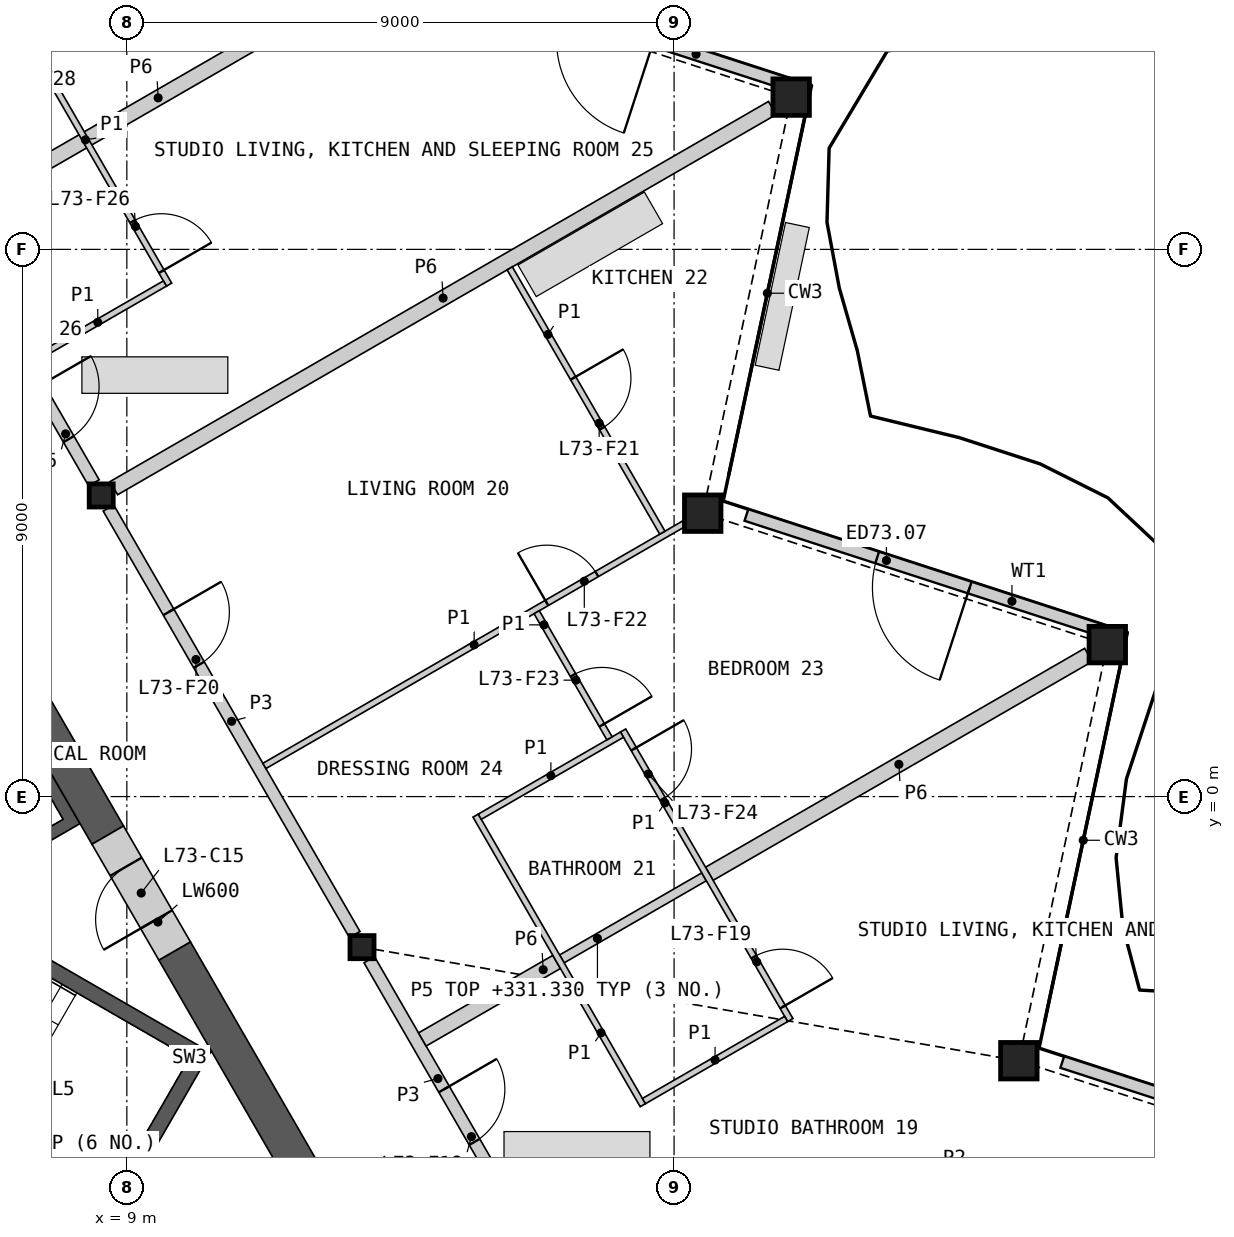
"""IFC4 building model, lengths in metres.
Left out: names, types, materials, properties, quantities, classifications, styles, units other than length and angle.
Written with IfcOpenShell. Run it as: python <this file> out.ifc"""

import sys

from ifc_helpers import new_model, si_unit, direction, frame, frame_2d, origin, origin_2d, place, context, subcontext, project, spatial, polyline, rectangle, hollow_rectangle, i_section, outline, extrude, element, fill, save


model = new_model("IFC4")
c1 = context("Model", 3, precision=1e-05, world=origin(), true_north=direction((0.0, 1.0)))
c2 = subcontext(c1, "Body", "Model", "MODEL_VIEW")
j1 = project(units=[si_unit("LENGTHUNIT", "METRE"), si_unit("PLANEANGLEUNIT", "RADIAN")], contexts=[c1])
p1 = place(None, origin())
s1 = spatial("IfcSite", under=j1, at=p1, CompositionType="ELEMENT")
p2 = place(p1, origin())
s2 = spatial("IfcBuilding", under=s1, at=p2, CompositionType="ELEMENT")
p3 = place(p2, frame((0.0, 0.0, 329.0)))
s3 = spatial("IfcBuildingStorey", under=s2, at=p3, CompositionType="ELEMENT", Elevation=329.0)
for number, where, z_axis, x_axis in (
    (1, (23.67, -4.344, 0.0), (0.0, 0.0, 1.0), (1.0, 0.0, 0.0)),
    (2, (25.125, 2.499, 0.0), (0.0, 0.0, 1.0), (1.0, 0.0, 0.0)),
    (3, (18.471, 4.661, 0.0), (0.0, 0.0, 1.0), (1.0, 0.0, 0.0)),
    (4, (19.926, 11.504, 0.0), (0.0, 0.0, 1.0), (1.0, 0.0, 0.0)),
):
    element("IfcColumn", number, at=place(p3, frame(where, z_axis=z_axis, x_axis=x_axis)), inside=s3, PredefinedType="COLUMN", context=c2, shape_type="SweptSolid", body=[
        extrude(hollow_rectangle(XDim=0.6, YDim=0.6, WallThickness=0.04, at=origin_2d()), origin(), (0.0, 0.0, 1.0), 3.4),
    ])
for number, where, z_axis, x_axis in (
    (5, (12.868, -2.476, 0.0), (0.0, 0.0, 1.0), (1.0, 0.0, 0.0)),
    (6, (8.578, 4.953, 0.0), (0.0, 0.0, 1.0), (1.0, 0.0, 0.0)),
):
    element("IfcColumn", number, at=place(p3, frame(where, z_axis=z_axis, x_axis=x_axis)), inside=s3, PredefinedType="COLUMN", context=c2, shape_type="SweptSolid", body=[
        extrude(i_section(OverallWidth=0.396, OverallDepth=0.381, WebThickness=0.019, FlangeThickness=0.03, at=origin_2d()), origin(), (0.0, 0.0, 1.0), 3.4),
    ])
p4 = place(p3, frame((30.207, -6.258, 0.0), z_axis=(0.0, 0.0, 1.0), x_axis=(-0.951056631566, 0.309016639608, 0.0)))
e7 = element("IfcWall", 7, at=p4, inside=s3, PredefinedType="SOLIDWALL", context=c2, shape_type="SweptSolid", body=[
    extrude(rectangle(XDim=6.122, YDim=0.2, at=frame_2d((3.061, 0.0))), origin(), (0.0, 0.0, 1.0), 2.488),
])
p5 = place(p4, frame((2.261, 0.0, 0.0)))
e8 = element("IfcOpeningElement", 8, at=p5, cuts=e7, PredefinedType="OPENING", context=c2, shape_type="SweptSolid", body=[
    extrude(rectangle(XDim=1.6, YDim=2.25, at=frame_2d((0.8, 1.125))), frame((0.0, 0.11, 0.0), z_axis=(0.0, -1.0, 0.0), x_axis=(1.0, 0.0, 0.0)), (0.0, 0.0, 1.0), 0.22),
])
p6 = place(p3, frame((25.012, 2.739, 0.0), z_axis=(0.0, 0.0, 1.0), x_axis=(-0.951056631566, 0.309016639608, 0.0)))
e9 = element("IfcWall", 9, at=p6, inside=s3, PredefinedType="SOLIDWALL", context=c2, shape_type="SweptSolid", body=[
    extrude(rectangle(XDim=6.122, YDim=0.2, at=frame_2d((3.061, 0.0))), origin(), (0.0, 0.0, 1.0), 2.488),
])
p7 = place(p6, frame((2.261, 0.0, 0.0)))
e10 = element("IfcOpeningElement", 10, at=p7, cuts=e9, PredefinedType="OPENING", context=c2, shape_type="SweptSolid", body=[
    extrude(rectangle(XDim=1.6, YDim=2.25, at=frame_2d((0.8, 1.125))), frame((0.0, 0.11, 0.0), z_axis=(0.0, -1.0, 0.0), x_axis=(1.0, 0.0, 0.0)), (0.0, 0.0, 1.0), 0.22),
])
p8 = place(p3, frame((19.817, 11.737, 0.0), z_axis=(0.0, 0.0, 1.0), x_axis=(-0.951056631566, 0.309016639608, 0.0)))
e11 = element("IfcWall", 11, at=p8, inside=s3, PredefinedType="SOLIDWALL", context=c2, shape_type="SweptSolid", body=[
    extrude(rectangle(XDim=6.122, YDim=0.2, at=frame_2d((3.061, 0.0))), origin(), (0.0, 0.0, 1.0), 2.488),
])
p9 = place(p8, frame((2.261, 0.0, 0.0)))
e12 = element("IfcOpeningElement", 12, at=p9, cuts=e11, PredefinedType="OPENING", context=c2, shape_type="SweptSolid", body=[
    extrude(rectangle(XDim=1.6, YDim=2.25, at=frame_2d((0.8, 1.125))), frame((0.0, 0.11, 0.0), z_axis=(0.0, -1.0, 0.0), x_axis=(1.0, 0.0, 0.0)), (0.0, 0.0, 1.0), 0.22),
])
p10 = place(p3, origin())
e13 = element("IfcWall", 13, at=p10, inside=s3, PredefinedType="SHEAR", context=c2, shape_type="SweptSolid", body=[
    extrude(outline(polyline([(1.561, 6.097), (3.731, 7.35), (8.231, -0.444), (6.061, -1.697), (5.96, -1.524), (7.952, -0.374), (6.952, 1.358), (4.96, 0.208), (4.861, 0.381), (6.852, 1.531), (5.852, 3.263), (3.861, 2.113), (3.76, 2.287), (5.752, 3.437), (4.752, 5.169), (2.76, 4.019), (2.66, 4.192), (4.652, 5.342), (3.652, 7.074), (1.66, 5.924), (1.561, 6.097)])), origin(), (0.0, 0.0, 1.0), 3.1),
])
p11 = place(p3, origin())
e14 = element("IfcWall", 14, at=p11, inside=s3, PredefinedType="SHEAR", context=c2, shape_type="SweptSolid", body=[
    extrude(outline(polyline([(3.763, -3.956), (8.83, -6.881), (8.738, -6.539), (3.888, -3.739), (3.763, -3.956)])), origin(), (0.0, 0.0, 1.0), 3.1),
])
p12 = place(p3, origin())
e15 = element("IfcWall", 15, at=p12, inside=s3, PredefinedType="SHEAR", context=c2, shape_type="SweptSolid", body=[
    extrude(outline(polyline([(8.83, -6.881), (10.374, -4.206), (10.032, -4.298), (8.738, -6.539), (8.83, -6.881)])), origin(), (0.0, 0.0, 1.0), 3.1),
])
p13 = place(p3, origin())
e16 = element("IfcWall", 16, at=p13, inside=s3, PredefinedType="SHEAR", context=c2, shape_type="SweptSolid", body=[
    extrude(outline(polyline([(10.032, -4.298), (10.374, -4.206), (5.307, -1.281), (5.182, -1.498), (10.032, -4.298)])), origin(), (0.0, 0.0, 1.0), 3.1),
])
p14 = place(p3, frame((8.686, -0.634, 0.0), z_axis=(0.0, 0.0, 1.0), x_axis=(-0.500004601921, 0.866022746848, 0.0)))
e17 = element("IfcWall", 17, at=p14, inside=s3, PredefinedType="SHEAR", context=c2, shape_type="SweptSolid", body=[
    extrude(rectangle(XDim=16.853, YDim=0.6, at=frame_2d((8.426, 0.0))), origin(), (0.0, 0.0, 1.0), 3.1),
])
p15 = place(p3, frame((12.221, -6.756, 0.0), z_axis=(0.0, 0.0, 1.0), x_axis=(-0.50000604952, 0.866021911064, 0.0)))
e18 = element("IfcWall", 18, at=p15, inside=s3, PredefinedType="SHEAR", context=c2, shape_type="SweptSolid", body=[
    extrude(rectangle(XDim=4.869, YDim=0.6, at=frame_2d((2.434, 0.0))), origin(), (0.0, 0.0, 1.0), 3.1),
])
p16 = place(p3, frame((9.786, -2.539, 0.0), z_axis=(0.0, 0.0, 1.0), x_axis=(-0.499981787252, 0.866035918664, 0.0)))
e19 = element("IfcWall", 19, at=p16, inside=s3, PredefinedType="SHEAR", context=c2, shape_type="SweptSolid", body=[
    extrude(rectangle(XDim=2.2, YDim=0.6, at=frame_2d((1.1, 0.0))), origin(), (0.0, 0.0, 1.0), 3.1),
])
p17 = place(p16, frame((0.6, 0.0, 0.0)))
e20 = element("IfcOpeningElement", 20, at=p17, cuts=e19, PredefinedType="OPENING", context=c2, shape_type="SweptSolid", body=[
    extrude(rectangle(XDim=1.0, YDim=2.1, at=frame_2d((0.5, 1.05))), frame((0.0, 0.31, 0.0), z_axis=(0.0, -1.0, 0.0), x_axis=(1.0, 0.0, 0.0)), (0.0, 0.0, 1.0), 0.62),
])
p18 = place(p3, frame((8.786, 5.073, 0.0), z_axis=(0.0, 0.0, 1.0), x_axis=(0.86602139559, 0.500006942333, 0.0)))
e21 = element("IfcWall", 21, at=p18, inside=s3, PredefinedType="PARTITIONING", context=c2, shape_type="SweptSolid", body=[
    extrude(rectangle(XDim=12.505, YDim=0.25, at=frame_2d((6.252, 0.0))), origin(), (0.0, 0.0, 1.0), 2.33),
])
p19 = place(p3, frame((4.409, 12.174, 0.0), z_axis=(0.0, 0.0, 1.0), x_axis=(0.499984266882, -0.866034487114, 0.0)))
e22 = element("IfcWall", 22, at=p19, inside=s3, PredefinedType="PARTITIONING", context=c2, shape_type="SweptSolid", body=[
    extrude(rectangle(XDim=8.099, YDim=0.2, at=frame_2d((4.049, 0.0))), origin(), (0.0, 0.0, 1.0), 3.1),
])
p20 = place(p19, frame((6.269, 0.0, 0.0)))
e23 = element("IfcOpeningElement", 23, at=p20, cuts=e22, PredefinedType="OPENING", context=c2, shape_type="SweptSolid", body=[
    extrude(rectangle(XDim=1.0, YDim=2.1, at=frame_2d((0.5, 1.05))), frame((0.0, 0.11, 0.0), z_axis=(0.0, -1.0, 0.0), x_axis=(1.0, 0.0, 0.0)), (0.0, 0.0, 1.0), 0.22),
])
p21 = place(p19, frame((1.164, 0.0, 0.0)))
e24 = element("IfcOpeningElement", 24, at=p21, cuts=e22, PredefinedType="OPENING", context=c2, shape_type="SweptSolid", body=[
    extrude(rectangle(XDim=1.0, YDim=2.1, at=frame_2d((0.5, 1.05))), frame((0.0, 0.11, 0.0), z_axis=(0.0, -1.0, 0.0), x_axis=(1.0, 0.0, 0.0)), (0.0, 0.0, 1.0), 0.22),
])
p22 = place(p3, frame((8.698, 4.745, 0.0), z_axis=(0.0, 0.0, 1.0), x_axis=(0.499984266882, -0.866034487114, 0.0)))
e25 = element("IfcWall", 25, at=p22, inside=s3, PredefinedType="PARTITIONING", context=c2, shape_type="SweptSolid", body=[
    extrude(rectangle(XDim=8.099, YDim=0.2, at=frame_2d((4.049, 0.0))), origin(), (0.0, 0.0, 1.0), 3.1),
])
p23 = place(p22, frame((1.976, 0.0, 0.0)))
e26 = element("IfcOpeningElement", 26, at=p23, cuts=e25, PredefinedType="OPENING", context=c2, shape_type="SweptSolid", body=[
    extrude(rectangle(XDim=1.0, YDim=2.1, at=frame_2d((0.5, 1.05))), frame((0.0, 0.11, 0.0), z_axis=(0.0, -1.0, 0.0), x_axis=(1.0, 0.0, 0.0)), (0.0, 0.0, 1.0), 0.22),
])
p24 = place(p3, frame((6.068, 9.501, 0.0), z_axis=(0.0, 0.0, 1.0), x_axis=(0.866022671543, 0.50000473235, 0.0)))
e27 = element("IfcWall", 27, at=p24, inside=s3, PredefinedType="PARTITIONING", context=c2, shape_type="SweptSolid", body=[
    extrude(rectangle(XDim=7.961, YDim=0.25, at=frame_2d((3.98, 0.0))), origin(), (0.0, 0.0, 1.0), 2.33),
])
p25 = place(p3, frame((18.58, -1.27, 0.0), z_axis=(0.0, 0.0, 1.0), x_axis=(0.866024647952, 0.500001309137, 0.0)))
e28 = element("IfcWall", 28, at=p25, inside=s3, PredefinedType="PARTITIONING", context=c2, shape_type="SweptSolid", body=[
    extrude(rectangle(XDim=7.2, YDim=0.25, at=frame_2d((3.6, 0.0))), origin(), (0.0, 0.0, 1.0), 2.33),
])
p26 = place(p3, frame((12.988, -2.684, 0.0), z_axis=(0.0, 0.0, 1.0), x_axis=(0.49999094734, -0.866030630277, 0.0)))
e29 = element("IfcWall", 29, at=p26, inside=s3, PredefinedType="PARTITIONING", context=c2, shape_type="SweptSolid", body=[
    extrude(rectangle(XDim=4.513, YDim=0.2, at=frame_2d((2.256, 0.0))), origin(), (0.0, 0.0, 1.0), 3.1),
])
p27 = place(p26, frame((2.459, 0.0, 0.0)))
e30 = element("IfcOpeningElement", 30, at=p27, cuts=e29, PredefinedType="OPENING", context=c2, shape_type="SweptSolid", body=[
    extrude(rectangle(XDim=1.0, YDim=2.1, at=frame_2d((0.5, 1.05))), frame((0.0, 0.11, 0.0), z_axis=(0.0, -1.0, 0.0), x_axis=(1.0, 0.0, 0.0)), (0.0, 0.0, 1.0), 0.22),
])
p28 = place(p3, frame((13.86, -3.995, 0.0), z_axis=(0.0, 0.0, 1.0), x_axis=(0.866030925526, 0.499990435942, 0.0)))
e31 = element("IfcWall", 31, at=p28, inside=s3, PredefinedType="PARTITIONING", context=c2, shape_type="SweptSolid", body=[
    extrude(rectangle(XDim=2.55, YDim=0.25, at=frame_2d((1.275, 0.0))), origin(), (0.0, 0.0, 1.0), 2.33),
])
p29 = place(p3, frame((16.155, -2.67, 0.0), z_axis=(0.0, 0.0, 1.0), x_axis=(0.86599734893, 0.500048589285, 0.0)))
e32 = element("IfcWall", 32, at=p29, inside=s3, PredefinedType="PLUMBINGWALL", context=c2, shape_type="SweptSolid", body=[
    extrude(rectangle(XDim=2.7, YDim=0.15, at=frame_2d((1.35, 0.0))), origin(), (0.0, 0.0, 1.0), 2.33),
])
p30 = place(p3, frame((11.262, 0.504, 0.0), z_axis=(0.0, 0.0, 1.0), x_axis=(0.866020217342, 0.500008983073, 0.0)))
e33 = element("IfcWall", 33, at=p30, inside=s3, PredefinedType="PARTITIONING", context=c2, shape_type="SweptSolid", body=[
    extrude(rectangle(XDim=7.966, YDim=0.1, at=frame_2d((3.983, 0.0))), origin(), (0.0, 0.0, 1.0), 2.33),
])
p31 = place(p30, frame((5.362, 0.0, 0.0)))
e34 = element("IfcOpeningElement", 34, at=p31, cuts=e33, PredefinedType="OPENING", context=c2, shape_type="SweptSolid", body=[
    extrude(rectangle(XDim=0.95, YDim=2.1, at=frame_2d((0.475, 1.05))), frame((0.0, 0.06, 0.0), z_axis=(0.0, -1.0, 0.0), x_axis=(1.0, 0.0, 0.0)), (0.0, 0.0, 1.0), 0.12),
])
p32 = place(p3, frame((17.161, 1.087, 0.0), z_axis=(0.0, 0.0, 1.0), x_axis=(0.499996545922, -0.866027397988, 0.0)))
e35 = element("IfcWall", 35, at=p32, inside=s3, PredefinedType="PARTITIONING", context=c2, shape_type="SweptSolid", body=[
    extrude(rectangle(XDim=5.5, YDim=0.1, at=frame_2d((2.75, 0.0))), origin(), (0.0, 0.0, 1.0), 2.33),
])
p33 = place(p32, frame((4.3, 0.0, 0.0)))
e36 = element("IfcOpeningElement", 36, at=p33, cuts=e35, PredefinedType="OPENING", context=c2, shape_type="SweptSolid", body=[
    extrude(rectangle(XDim=0.95, YDim=2.1, at=frame_2d((0.475, 1.05))), frame((0.0, 0.06, 0.0), z_axis=(0.0, -1.0, 0.0), x_axis=(1.0, 0.0, 0.0)), (0.0, 0.0, 1.0), 0.12),
])
p34 = place(p32, frame((0.351, 0.0, 0.0)))
e37 = element("IfcOpeningElement", 37, at=p34, cuts=e35, PredefinedType="OPENING", context=c2, shape_type="SweptSolid", body=[
    extrude(rectangle(XDim=0.95, YDim=2.1, at=frame_2d((0.475, 1.05))), frame((0.0, 0.06, 0.0), z_axis=(0.0, -1.0, 0.0), x_axis=(1.0, 0.0, 0.0)), (0.0, 0.0, 1.0), 0.12),
])
p35 = place(p3, frame((14.736, -0.313, 0.0), z_axis=(0.0, 0.0, 1.0), x_axis=(0.49997732567, -0.866038494419, 0.0)))
e38 = element("IfcWall", 38, at=p35, inside=s3, PredefinedType="PARTITIONING", context=c2, shape_type="SweptSolid", body=[
    extrude(rectangle(XDim=5.5, YDim=0.1, at=frame_2d((2.75, 0.0))), origin(), (0.0, 0.0, 1.0), 2.33),
])
p36 = place(p3, frame((6.944, 13.183, 0.0), z_axis=(0.0, 0.0, 1.0), x_axis=(0.499996545922, -0.866027397988, 0.0)))
e39 = element("IfcWall", 39, at=p36, inside=s3, PredefinedType="PARTITIONING", context=c2, shape_type="SweptSolid", body=[
    extrude(rectangle(XDim=5.5, YDim=0.1, at=frame_2d((2.75, 0.0))), origin(), (0.0, 0.0, 1.0), 2.33),
])
p37 = place(p36, frame((4.3, 0.0, 0.0)))
e40 = element("IfcOpeningElement", 40, at=p37, cuts=e39, PredefinedType="OPENING", context=c2, shape_type="SweptSolid", body=[
    extrude(rectangle(XDim=0.95, YDim=2.1, at=frame_2d((0.475, 1.05))), frame((0.0, 0.06, 0.0), z_axis=(0.0, -1.0, 0.0), x_axis=(1.0, 0.0, 0.0)), (0.0, 0.0, 1.0), 0.12),
])
p38 = place(p36, frame((0.25, 0.0, 0.0)))
e41 = element("IfcOpeningElement", 41, at=p38, cuts=e39, PredefinedType="OPENING", context=c2, shape_type="SweptSolid", body=[
    extrude(rectangle(XDim=0.95, YDim=2.1, at=frame_2d((0.475, 1.05))), frame((0.0, 0.06, 0.0), z_axis=(0.0, -1.0, 0.0), x_axis=(1.0, 0.0, 0.0)), (0.0, 0.0, 1.0), 0.12),
])
p39 = place(p3, frame((15.297, 8.688, 0.0), z_axis=(0.0, 0.0, 1.0), x_axis=(0.499989096993, -0.866031698547, 0.0)))
e42 = element("IfcWall", 42, at=p39, inside=s3, PredefinedType="PARTITIONING", context=c2, shape_type="SweptSolid", body=[
    extrude(rectangle(XDim=5.02, YDim=0.1, at=frame_2d((2.51, 0.0))), origin(), (0.0, 0.0, 1.0), 2.33),
])
p40 = place(p39, frame((2.086, 0.0, 0.0)))
e43 = element("IfcOpeningElement", 43, at=p40, cuts=e42, PredefinedType="OPENING", context=c2, shape_type="SweptSolid", body=[
    extrude(rectangle(XDim=0.95, YDim=2.1, at=frame_2d((0.475, 1.05))), frame((0.0, 0.06, 0.0), z_axis=(0.0, -1.0, 0.0), x_axis=(1.0, 0.0, 0.0)), (0.0, 0.0, 1.0), 0.12),
])
p41 = place(p3, frame((17.505, -5.008, 0.0), z_axis=(0.0, 0.0, 1.0), x_axis=(0.866019956843, 0.50000943426, 0.0)))
e44 = element("IfcWall", 44, at=p41, inside=s3, PredefinedType="PARTITIONING", context=c2, shape_type="SweptSolid", body=[
    extrude(rectangle(XDim=2.7, YDim=0.1, at=frame_2d((1.35, 0.0))), origin(), (0.0, 0.0, 1.0), 2.33),
])
p42 = place(p3, frame((14.805, -0.331, 0.0), z_axis=(0.0, 0.0, 1.0), x_axis=(0.866059108428, 0.4999416173, 0.0)))
e45 = element("IfcWall", 45, at=p42, inside=s3, PredefinedType="PARTITIONING", context=c2, shape_type="SweptSolid", body=[
    extrude(rectangle(XDim=2.7, YDim=0.1, at=frame_2d((1.35, 0.0))), origin(), (0.0, 0.0, 1.0), 2.33),
])
p43 = place(p3, frame((7.418, 7.163, 0.0), z_axis=(0.0, 0.0, 1.0), x_axis=(0.866054858364, 0.499948979701, 0.0)))
e46 = element("IfcWall", 46, at=p43, inside=s3, PredefinedType="PARTITIONING", context=c2, shape_type="SweptSolid", body=[
    extrude(rectangle(XDim=2.55, YDim=0.1, at=frame_2d((1.275, 0.0))), origin(), (0.0, 0.0, 1.0), 2.33),
])
p44 = place(p3, frame((15.74, 3.032, 0.0), z_axis=(0.0, 0.0, 1.0), x_axis=(0.500075453945, -0.865981836046, 0.0)))
e47 = element("IfcWall", 47, at=p44, inside=s3, PredefinedType="PARTITIONING", context=c2, shape_type="SweptSolid", body=[
    extrude(rectangle(XDim=2.395, YDim=0.1, at=frame_2d((1.197, 0.0))), origin(), (0.0, 0.0, 1.0), 2.33),
])
p45 = place(p44, frame((1.195, 0.0, 0.0)))
e48 = element("IfcOpeningElement", 48, at=p45, cuts=e47, PredefinedType="OPENING", context=c2, shape_type="SweptSolid", body=[
    extrude(rectangle(XDim=0.95, YDim=2.1, at=frame_2d((0.475, 1.05))), frame((0.0, 0.06, 0.0), z_axis=(0.0, -1.0, 0.0), x_axis=(1.0, 0.0, 0.0)), (0.0, 0.0, 1.0), 0.12),
])
p46 = place(p7, origin())
e49 = element("IfcDoor", 49, at=p46, inside=s3, OperationType="DOUBLE_DOOR_SINGLE_SWING", PredefinedType="DOOR", context=c2, shape_type="SweptSolid", body=[
    extrude(rectangle(XDim=1.6, YDim=2.25, at=frame_2d((0.8, 1.125))), frame((0.0, 0.025, 0.0), z_axis=(0.0, -1.0, 0.0), x_axis=(1.0, 0.0, 0.0)), (0.0, 0.0, 1.0), 0.05),
])
fill(e10, e49)
p47 = place(p17, origin())
e50 = element("IfcDoor", 50, at=p47, inside=s3, OperationType="SINGLE_SWING_LEFT", PredefinedType="DOOR", context=c2, shape_type="SweptSolid", body=[
    extrude(rectangle(XDim=1.0, YDim=2.1, at=frame_2d((0.5, 1.05))), frame((0.0, 0.055, 0.0), z_axis=(0.0, -1.0, 0.0), x_axis=(1.0, 0.0, 0.0)), (0.0, 0.0, 1.0), 0.05),
])
fill(e20, e50)
p48 = place(p27, origin())
e51 = element("IfcDoor", 51, at=p48, inside=s3, OperationType="SINGLE_SWING_LEFT", PredefinedType="DOOR", context=c2, shape_type="SweptSolid", body=[
    extrude(rectangle(XDim=1.0, YDim=2.1, at=frame_2d((0.5, 1.05))), frame((0.0, 0.025, 0.0), z_axis=(0.0, -1.0, 0.0), x_axis=(1.0, 0.0, 0.0)), (0.0, 0.0, 1.0), 0.05),
])
fill(e30, e51)
p49 = place(p33, origin())
e52 = element("IfcDoor", 52, at=p49, inside=s3, OperationType="SINGLE_SWING_RIGHT", PredefinedType="DOOR", context=c2, shape_type="SweptSolid", body=[
    extrude(rectangle(XDim=0.95, YDim=2.1, at=frame_2d((0.475, 1.05))), frame((0.0, 0.025, 0.0), z_axis=(0.0, -1.0, 0.0), x_axis=(1.0, 0.0, 0.0)), (0.0, 0.0, 1.0), 0.05),
])
fill(e36, e52)
p50 = place(p23, origin())
e53 = element("IfcDoor", 53, at=p50, inside=s3, OperationType="SINGLE_SWING_LEFT", PredefinedType="DOOR", context=c2, shape_type="SweptSolid", body=[
    extrude(rectangle(XDim=1.0, YDim=2.1, at=frame_2d((0.5, 1.05))), frame((0.0, 0.025, 0.0), z_axis=(0.0, -1.0, 0.0), x_axis=(1.0, 0.0, 0.0)), (0.0, 0.0, 1.0), 0.05),
])
fill(e26, e53)
p51 = place(p40, origin())
e54 = element("IfcDoor", 54, at=p51, inside=s3, OperationType="SINGLE_SWING_LEFT", PredefinedType="DOOR", context=c2, shape_type="SweptSolid", body=[
    extrude(rectangle(XDim=0.95, YDim=2.1, at=frame_2d((0.475, 1.05))), frame((0.0, 0.025, 0.0), z_axis=(0.0, -1.0, 0.0), x_axis=(1.0, 0.0, 0.0)), (0.0, 0.0, 1.0), 0.05),
])
fill(e43, e54)
p52 = place(p31, origin())
e55 = element("IfcDoor", 55, at=p52, inside=s3, OperationType="SINGLE_SWING_LEFT", PredefinedType="DOOR", context=c2, shape_type="SweptSolid", body=[
    extrude(rectangle(XDim=0.95, YDim=2.1, at=frame_2d((0.475, 1.05))), frame((0.0, 0.025, 0.0), z_axis=(0.0, -1.0, 0.0), x_axis=(1.0, 0.0, 0.0)), (0.0, 0.0, 1.0), 0.05),
])
fill(e34, e55)
p53 = place(p45, origin())
e56 = element("IfcDoor", 56, at=p53, inside=s3, OperationType="SINGLE_SWING_RIGHT", PredefinedType="DOOR", context=c2, shape_type="SweptSolid", body=[
    extrude(rectangle(XDim=0.95, YDim=2.1, at=frame_2d((0.475, 1.05))), frame((0.0, 0.025, 0.0), z_axis=(0.0, -1.0, 0.0), x_axis=(1.0, 0.0, 0.0)), (0.0, 0.0, 1.0), 0.05),
])
fill(e48, e56)
p54 = place(p34, origin())
e57 = element("IfcDoor", 57, at=p54, inside=s3, OperationType="SINGLE_SWING_LEFT", PredefinedType="DOOR", context=c2, shape_type="SweptSolid", body=[
    extrude(rectangle(XDim=0.95, YDim=2.1, at=frame_2d((0.475, 1.05))), frame((0.0, 0.025, 0.0), z_axis=(0.0, -1.0, 0.0), x_axis=(1.0, 0.0, 0.0)), (0.0, 0.0, 1.0), 0.05),
])
fill(e37, e57)
p55 = place(p20, origin())
e58 = element("IfcDoor", 58, at=p55, inside=s3, OperationType="SINGLE_SWING_LEFT", PredefinedType="DOOR", context=c2, shape_type="SweptSolid", body=[
    extrude(rectangle(XDim=1.0, YDim=2.1, at=frame_2d((0.5, 1.05))), frame((0.0, 0.025, 0.0), z_axis=(0.0, -1.0, 0.0), x_axis=(1.0, 0.0, 0.0)), (0.0, 0.0, 1.0), 0.05),
])
fill(e23, e58)
p56 = place(p37, origin())
e59 = element("IfcDoor", 59, at=p56, inside=s3, OperationType="SINGLE_SWING_RIGHT", PredefinedType="DOOR", context=c2, shape_type="SweptSolid", body=[
    extrude(rectangle(XDim=0.95, YDim=2.1, at=frame_2d((0.475, 1.05))), frame((0.0, 0.025, 0.0), z_axis=(0.0, -1.0, 0.0), x_axis=(1.0, 0.0, 0.0)), (0.0, 0.0, 1.0), 0.05),
])
fill(e40, e59)
save(model, sys.argv[1])
